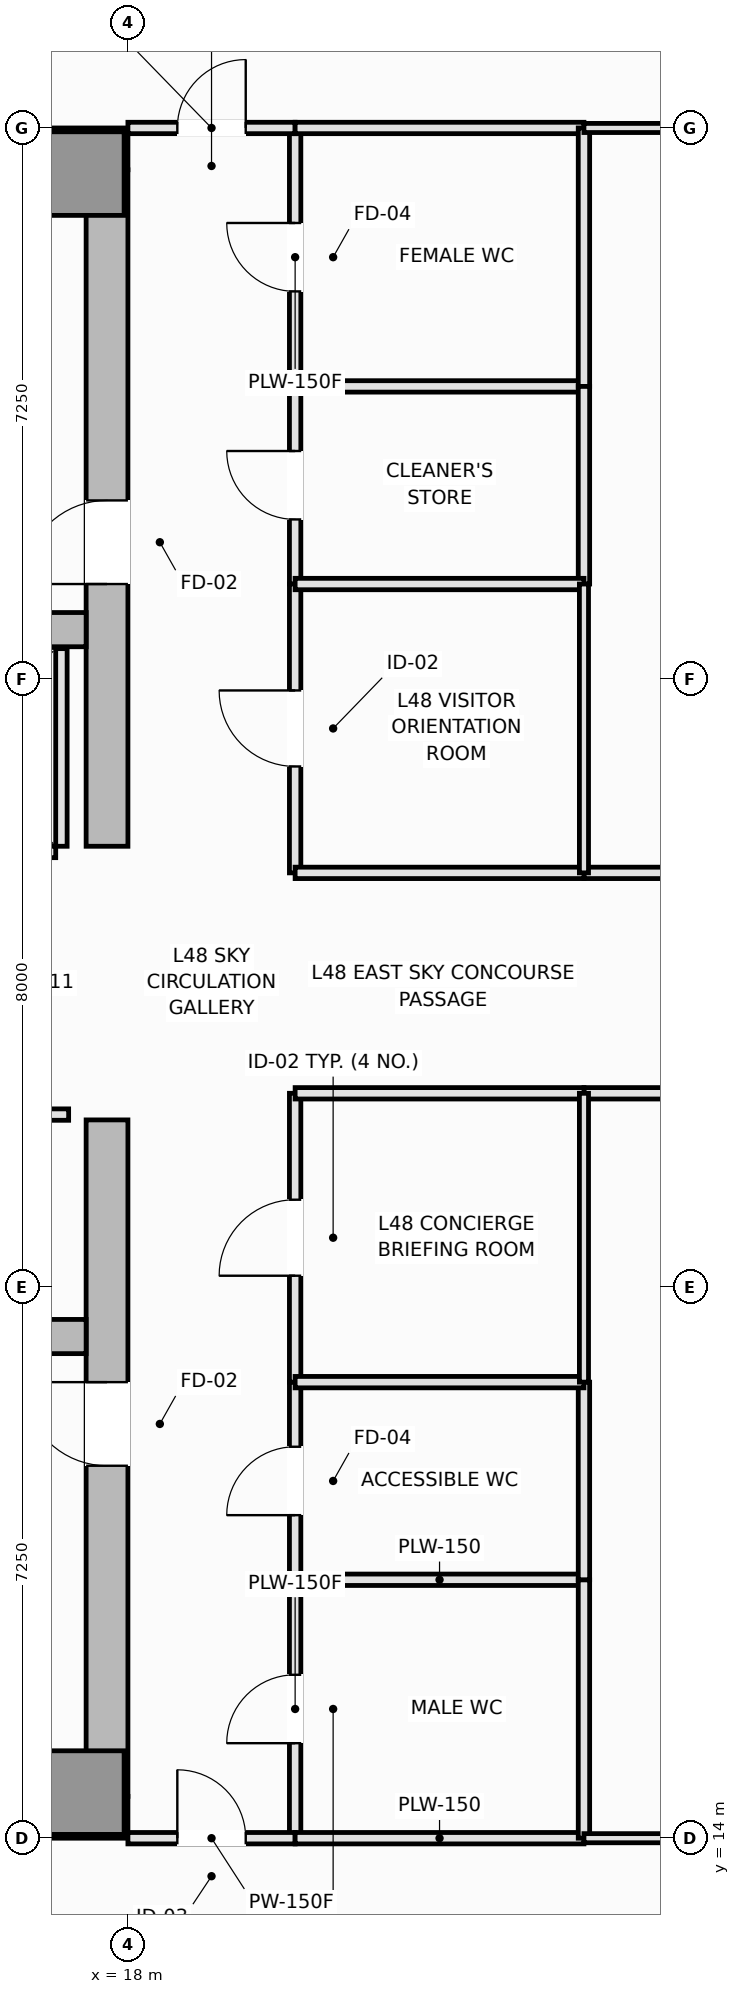
"""IFC4 building model, lengths in metres.
Left out: names, types, materials, properties, quantities, classifications, styles, units other than length and angle.
Written with IfcOpenShell. Run it as: python <this file> out.ifc"""

import sys

from ifc_helpers import new_model, si_unit, direction, frame, frame_2d, origin, origin_2d, place, context, subcontext, project, spatial, rectangle, extrude, element, fill, save


model = new_model("IFC4")
c1 = context("Model", 3, precision=1e-05, world=origin(), true_north=direction((0.0, 1.0)))
c2 = subcontext(c1, "Body", "Model", "MODEL_VIEW")
j1 = project(units=[si_unit("LENGTHUNIT", "METRE"), si_unit("PLANEANGLEUNIT", "RADIAN")], contexts=[c1])
p1 = place(None, origin())
s1 = spatial("IfcSite", under=j1, at=p1, CompositionType="ELEMENT")
p2 = place(p1, origin())
s2 = spatial("IfcBuilding", under=s1, at=p2, CompositionType="ELEMENT")
p3 = place(p2, frame((0.0, 0.0, 183.65)))
s3 = spatial("IfcBuildingStorey", under=s2, at=p3, CompositionType="ELEMENT", Elevation=183.65)
for number, where, z_axis, x_axis in (
    (1, (4.5, 14.275, 0.0), (0.0, 0.0, 1.0), (1.0, 0.0, 0.0)),
    (2, (4.5, 36.225, 0.0), (0.0, 0.0, 1.0), (1.0, 0.0, 0.0)),
):
    element("IfcWall", number, at=place(p3, frame(where, z_axis=z_axis, x_axis=x_axis)), inside=s3, PredefinedType="SHEAR", context=c2, shape_type="SweptSolid", body=[
        extrude(rectangle(XDim=13.5, YDim=0.55, at=frame_2d((6.75, 0.0))), origin(), (0.0, 0.0, 1.0), 4.4),
    ])
p4 = place(p3, frame((17.725, 14.55, 0.0), z_axis=(0.0, 0.0, 1.0), x_axis=(0.0, 1.0, 0.0)))
e3 = element("IfcWall", 3, at=p4, inside=s3, PredefinedType="SHEAR", context=c2, shape_type="SweptSolid", body=[
    extrude(rectangle(XDim=8.9, YDim=0.55, at=frame_2d((4.45, 0.0))), origin(), (0.0, 0.0, 1.0), 4.4),
])
p5 = place(p4, frame((4.35, 0.0, 0.0)))
e4 = element("IfcOpeningElement", 4, at=p5, cuts=e3, PredefinedType="OPENING", context=c2, shape_type="SweptSolid", body=[
    extrude(rectangle(XDim=1.1, YDim=2.15, at=frame_2d((0.55, 1.075))), frame((0.0, 0.285, 0.0), z_axis=(0.0, -1.0, 0.0), x_axis=(1.0, 0.0, 0.0)), (0.0, 0.0, 1.0), 0.57),
])
p6 = place(p3, frame((17.725, 27.05, 0.0), z_axis=(0.0, 0.0, 1.0), x_axis=(0.0, 1.0, 0.0)))
e5 = element("IfcWall", 5, at=p6, inside=s3, PredefinedType="SHEAR", context=c2, shape_type="SweptSolid", body=[
    extrude(rectangle(XDim=8.9, YDim=0.55, at=frame_2d((4.45, 0.0))), origin(), (0.0, 0.0, 1.0), 4.4),
])
p7 = place(p6, frame((3.45, 0.0, 0.0)))
e6 = element("IfcOpeningElement", 6, at=p7, cuts=e5, PredefinedType="OPENING", context=c2, shape_type="SweptSolid", body=[
    extrude(rectangle(XDim=1.1, YDim=2.15, at=frame_2d((0.55, 1.075))), frame((0.0, 0.285, 0.0), z_axis=(0.0, -1.0, 0.0), x_axis=(1.0, 0.0, 0.0)), (0.0, 0.0, 1.0), 0.57),
])
for number, where, z_axis, x_axis in (
    (7, (5.05, 20.6, 0.0), (0.0, 0.0, 1.0), (1.0, 0.0, 0.0)),
    (8, (5.05, 29.9, 0.0), (0.0, 0.0, 1.0), (1.0, 0.0, 0.0)),
):
    element("IfcWall", number, at=place(p3, frame(where, z_axis=z_axis, x_axis=x_axis)), inside=s3, PredefinedType="SHEAR", context=c2, shape_type="SweptSolid", body=[
        extrude(rectangle(XDim=12.4, YDim=0.45, at=frame_2d((6.2, 0.0))), origin(), (0.0, 0.0, 1.0), 4.4),
    ])
for number, where, z_axis, x_axis in (
    (9, (17.4, 14.6, 0.0), (0.0, 0.0, 1.0), (1.0, 0.0, 0.0)),
    (10, (17.4, 35.9, 0.0), (0.0, 0.0, 1.0), (1.0, 0.0, 0.0)),
):
    element("IfcColumn", number, at=place(p3, frame(where, z_axis=z_axis, x_axis=x_axis)), inside=s3, PredefinedType="PILASTER", context=c2, shape_type="SweptSolid", body=[
        extrude(rectangle(XDim=1.1, YDim=1.1, at=origin_2d()), origin(), (0.0, 0.0, 1.0), 4.4),
    ])
p8 = place(p3, frame((14.5, 26.975, 0.0), z_axis=(0.0, 0.0, 1.0), x_axis=(1.0, 0.0, 0.0)))
e11 = element("IfcWall", 11, at=p8, inside=s3, PredefinedType="PARTITIONING", context=c2, shape_type="SweptSolid", body=[
    extrude(rectangle(XDim=2.55, YDim=0.15, at=frame_2d((1.275, 0.0))), origin(), (0.0, 0.0, 1.0), 4.22),
])
p9 = place(p8, frame((0.625, 0.0, 0.0)))
e12 = element("IfcOpeningElement", 12, at=p9, cuts=e11, PredefinedType="OPENING", context=c2, shape_type="SweptSolid", body=[
    extrude(rectangle(XDim=1.3, YDim=2.2, at=frame_2d((0.65, 1.1))), frame((0.0, 0.085, 0.0), z_axis=(0.0, -1.0, 0.0), x_axis=(1.0, 0.0, 0.0)), (0.0, 0.0, 1.0), 0.17),
])
p10 = place(p3, frame((17.125, 27.05, 0.0), z_axis=(0.0, 0.0, 1.0), x_axis=(0.0, 1.0, 0.0)))
e13 = element("IfcWall", 13, at=p10, inside=s3, PredefinedType="PARTITIONING", context=c2, shape_type="SweptSolid", body=[
    extrude(rectangle(XDim=2.6, YDim=0.15, at=frame_2d((1.3, 0.0))), origin(), (0.0, 0.0, 1.0), 4.22),
])
p11 = place(p3, frame((14.33, 23.52, 0.0), z_axis=(0.0, 0.0, 1.0), x_axis=(1.0, 0.0, 0.0)))
e14 = element("IfcWall", 14, at=p11, inside=s3, PredefinedType="PARTITIONING", context=c2, shape_type="SweptSolid", body=[
    extrude(rectangle(XDim=2.89, YDim=0.15, at=frame_2d((1.445, 0.0))), origin(), (0.0, 0.0, 1.0), 4.22),
])
p12 = place(p11, frame((0.28, 0.0, 0.0)))
e15 = element("IfcOpeningElement", 15, at=p12, cuts=e14, PredefinedType="OPENING", context=c2, shape_type="SweptSolid", body=[
    extrude(rectangle(XDim=0.9, YDim=2.1, at=frame_2d((0.45, 1.05))), frame((0.0, 0.085, 0.0), z_axis=(0.0, -1.0, 0.0), x_axis=(1.0, 0.0, 0.0)), (0.0, 0.0, 1.0), 0.17),
])
p13 = place(p11, frame((1.71, 0.0, 0.0)))
e16 = element("IfcOpeningElement", 16, at=p13, cuts=e14, PredefinedType="OPENING", context=c2, shape_type="SweptSolid", body=[
    extrude(rectangle(XDim=0.9, YDim=2.1, at=frame_2d((0.45, 1.05))), frame((0.0, 0.085, 0.0), z_axis=(0.0, -1.0, 0.0), x_axis=(1.0, 0.0, 0.0)), (0.0, 0.0, 1.0), 0.17),
])
p14 = place(p3, frame((20.2, 14.0, 0.0), z_axis=(0.0, 0.0, 1.0), x_axis=(0.0, 1.0, 0.0)))
e17 = element("IfcWall", 17, at=p14, inside=s3, PredefinedType="PLUMBINGWALL", context=c2, shape_type="SweptSolid", body=[
    extrude(rectangle(XDim=3.4, YDim=0.15, at=frame_2d((1.7, 0.0))), origin(), (0.0, 0.0, 1.0), 4.22),
])
p15 = place(p14, frame((1.25, 0.0, 0.0)))
e18 = element("IfcOpeningElement", 18, at=p15, cuts=e17, PredefinedType="OPENING", context=c2, shape_type="SweptSolid", body=[
    extrude(rectangle(XDim=0.9, YDim=2.1, at=frame_2d((0.45, 1.05))), frame((0.0, 0.085, 0.0), z_axis=(0.0, -1.0, 0.0), x_axis=(1.0, 0.0, 0.0)), (0.0, 0.0, 1.0), 0.17),
])
p16 = place(p3, frame((20.2, 33.1, 0.0), z_axis=(0.0, 0.0, 1.0), x_axis=(0.0, 1.0, 0.0)))
e19 = element("IfcWall", 19, at=p16, inside=s3, PredefinedType="PLUMBINGWALL", context=c2, shape_type="SweptSolid", body=[
    extrude(rectangle(XDim=3.4, YDim=0.15, at=frame_2d((1.7, 0.0))), origin(), (0.0, 0.0, 1.0), 4.22),
])
p17 = place(p16, frame((1.25, 0.0, 0.0)))
e20 = element("IfcOpeningElement", 20, at=p17, cuts=e19, PredefinedType="OPENING", context=c2, shape_type="SweptSolid", body=[
    extrude(rectangle(XDim=0.9, YDim=2.1, at=frame_2d((0.45, 1.05))), frame((0.0, 0.085, 0.0), z_axis=(0.0, -1.0, 0.0), x_axis=(1.0, 0.0, 0.0)), (0.0, 0.0, 1.0), 0.17),
])
p18 = place(p3, frame((20.2, 17.4, 0.0), z_axis=(0.0, 0.0, 1.0), x_axis=(0.0, 1.0, 0.0)))
e21 = element("IfcWall", 21, at=p18, inside=s3, PredefinedType="PLUMBINGWALL", context=c2, shape_type="SweptSolid", body=[
    extrude(rectangle(XDim=2.6, YDim=0.15, at=frame_2d((1.3, 0.0))), origin(), (0.0, 0.0, 1.0), 4.22),
])
p19 = place(p18, frame((0.85, 0.0, 0.0)))
e22 = element("IfcOpeningElement", 22, at=p19, cuts=e21, PredefinedType="OPENING", context=c2, shape_type="SweptSolid", body=[
    extrude(rectangle(XDim=0.9, YDim=2.1, at=frame_2d((0.45, 1.05))), frame((0.0, 0.085, 0.0), z_axis=(0.0, -1.0, 0.0), x_axis=(1.0, 0.0, 0.0)), (0.0, 0.0, 1.0), 0.17),
])
p20 = place(p3, frame((20.2, 30.5, 0.0), z_axis=(0.0, 0.0, 1.0), x_axis=(0.0, 1.0, 0.0)))
e23 = element("IfcWall", 23, at=p20, inside=s3, PredefinedType="PLUMBINGWALL", context=c2, shape_type="SweptSolid", body=[
    extrude(rectangle(XDim=2.6, YDim=0.15, at=frame_2d((1.3, 0.0))), origin(), (0.0, 0.0, 1.0), 4.22),
])
p21 = place(p20, frame((0.85, 0.0, 0.0)))
e24 = element("IfcOpeningElement", 24, at=p21, cuts=e23, PredefinedType="OPENING", context=c2, shape_type="SweptSolid", body=[
    extrude(rectangle(XDim=0.9, YDim=2.1, at=frame_2d((0.45, 1.05))), frame((0.0, 0.085, 0.0), z_axis=(0.0, -1.0, 0.0), x_axis=(1.0, 0.0, 0.0)), (0.0, 0.0, 1.0), 0.17),
])
p22 = place(p3, frame((18.0, 14.0, 0.0), z_axis=(0.0, 0.0, 1.0), x_axis=(1.0, 0.0, 0.0)))
e25 = element("IfcWall", 25, at=p22, inside=s3, PredefinedType="PARTITIONING", context=c2, shape_type="SweptSolid", body=[
    extrude(rectangle(XDim=2.2, YDim=0.15, at=frame_2d((1.1, 0.0))), origin(), (0.0, 0.0, 1.0), 4.22),
])
p23 = place(p22, frame((0.65, 0.0, 0.0)))
e26 = element("IfcOpeningElement", 26, at=p23, cuts=e25, PredefinedType="OPENING", context=c2, shape_type="SweptSolid", body=[
    extrude(rectangle(XDim=0.9, YDim=2.1, at=frame_2d((0.45, 1.05))), frame((0.0, 0.085, 0.0), z_axis=(0.0, -1.0, 0.0), x_axis=(1.0, 0.0, 0.0)), (0.0, 0.0, 1.0), 0.17),
])
p24 = place(p3, frame((18.0, 36.5, 0.0), z_axis=(0.0, 0.0, 1.0), x_axis=(1.0, 0.0, 0.0)))
e27 = element("IfcWall", 27, at=p24, inside=s3, PredefinedType="PARTITIONING", context=c2, shape_type="SweptSolid", body=[
    extrude(rectangle(XDim=2.2, YDim=0.15, at=frame_2d((1.1, 0.0))), origin(), (0.0, 0.0, 1.0), 4.22),
])
p25 = place(p24, frame((0.65, 0.0, 0.0)))
e28 = element("IfcOpeningElement", 28, at=p25, cuts=e27, PredefinedType="OPENING", context=c2, shape_type="SweptSolid", body=[
    extrude(rectangle(XDim=0.9, YDim=2.1, at=frame_2d((0.45, 1.05))), frame((0.0, 0.085, 0.0), z_axis=(0.0, -1.0, 0.0), x_axis=(1.0, 0.0, 0.0)), (0.0, 0.0, 1.0), 0.17),
])
p26 = place(p3, frame((20.2, 20.0, 0.0), z_axis=(0.0, 0.0, 1.0), x_axis=(0.0, 1.0, 0.0)))
e29 = element("IfcWall", 29, at=p26, inside=s3, PredefinedType="PARTITIONING", context=c2, shape_type="SweptSolid", body=[
    extrude(rectangle(XDim=3.8, YDim=0.15, at=frame_2d((1.9, 0.0))), origin(), (0.0, 0.0, 1.0), 4.22),
])
p27 = place(p26, frame((1.4, 0.0, 0.0)))
e30 = element("IfcOpeningElement", 30, at=p27, cuts=e29, PredefinedType="OPENING", context=c2, shape_type="SweptSolid", body=[
    extrude(rectangle(XDim=1.0, YDim=2.15, at=frame_2d((0.5, 1.075))), frame((0.0, 0.085, 0.0), z_axis=(0.0, -1.0, 0.0), x_axis=(1.0, 0.0, 0.0)), (0.0, 0.0, 1.0), 0.17),
])
p28 = place(p3, frame((20.2, 26.7, 0.0), z_axis=(0.0, 0.0, 1.0), x_axis=(0.0, 1.0, 0.0)))
e31 = element("IfcWall", 31, at=p28, inside=s3, PredefinedType="PARTITIONING", context=c2, shape_type="SweptSolid", body=[
    extrude(rectangle(XDim=3.8, YDim=0.15, at=frame_2d((1.9, 0.0))), origin(), (0.0, 0.0, 1.0), 4.22),
])
p29 = place(p28, frame((1.4, 0.0, 0.0)))
e32 = element("IfcOpeningElement", 32, at=p29, cuts=e31, PredefinedType="OPENING", context=c2, shape_type="SweptSolid", body=[
    extrude(rectangle(XDim=1.0, YDim=2.15, at=frame_2d((0.5, 1.075))), frame((0.0, 0.085, 0.0), z_axis=(0.0, -1.0, 0.0), x_axis=(1.0, 0.0, 0.0)), (0.0, 0.0, 1.0), 0.17),
])
p30 = place(p3, frame((24.0, 23.8, 0.0), z_axis=(0.0, 0.0, 1.0), x_axis=(1.0, 0.0, 0.0)))
e33 = element("IfcWall", 33, at=p30, inside=s3, PredefinedType="PARTITIONING", context=c2, shape_type="SweptSolid", body=[
    extrude(rectangle(XDim=10.5, YDim=0.15, at=frame_2d((5.25, 0.0))), origin(), (0.0, 0.0, 1.0), 4.22),
])
p31 = place(p30, frame((4.75, 0.0, 0.0)))
e34 = element("IfcOpeningElement", 34, at=p31, cuts=e33, PredefinedType="OPENING", context=c2, shape_type="SweptSolid", body=[
    extrude(rectangle(XDim=1.0, YDim=2.15, at=frame_2d((0.5, 1.075))), frame((0.0, 0.085, 0.0), z_axis=(0.0, -1.0, 0.0), x_axis=(1.0, 0.0, 0.0)), (0.0, 0.0, 1.0), 0.17),
])
p32 = place(p3, frame((24.0, 26.7, 0.0), z_axis=(0.0, 0.0, 1.0), x_axis=(1.0, 0.0, 0.0)))
e35 = element("IfcWall", 35, at=p32, inside=s3, PredefinedType="PARTITIONING", context=c2, shape_type="SweptSolid", body=[
    extrude(rectangle(XDim=10.5, YDim=0.15, at=frame_2d((5.25, 0.0))), origin(), (0.0, 0.0, 1.0), 4.22),
])
p33 = place(p32, frame((4.75, 0.0, 0.0)))
e36 = element("IfcOpeningElement", 36, at=p33, cuts=e35, PredefinedType="OPENING", context=c2, shape_type="SweptSolid", body=[
    extrude(rectangle(XDim=1.0, YDim=2.15, at=frame_2d((0.5, 1.075))), frame((0.0, 0.085, 0.0), z_axis=(0.0, -1.0, 0.0), x_axis=(1.0, 0.0, 0.0)), (0.0, 0.0, 1.0), 0.17),
])
for number, where, z_axis, x_axis in (
    (37, (20.2, 23.8, 0.0), (0.0, 0.0, 1.0), (1.0, 0.0, 0.0)),
    (38, (20.2, 26.7, 0.0), (0.0, 0.0, 1.0), (1.0, 0.0, 0.0)),
):
    element("IfcWall", number, at=place(p3, frame(where, z_axis=z_axis, x_axis=x_axis)), inside=s3, PredefinedType="PARTITIONING", context=c2, shape_type="SweptSolid", body=[
        extrude(rectangle(XDim=3.8, YDim=0.15, at=frame_2d((1.9, 0.0))), origin(), (0.0, 0.0, 1.0), 4.22),
    ])
for number, where, z_axis, x_axis in (
    (39, (20.2, 17.4, 0.0), (0.0, 0.0, 1.0), (1.0, 0.0, 0.0)),
    (40, (20.2, 14.0, 0.0), (0.0, 0.0, 1.0), (1.0, 0.0, 0.0)),
):
    element("IfcWall", number, at=place(p3, frame(where, z_axis=z_axis, x_axis=x_axis)), inside=s3, PredefinedType="PLUMBINGWALL", context=c2, shape_type="SweptSolid", body=[
        extrude(rectangle(XDim=3.8, YDim=0.15, at=frame_2d((1.9, 0.0))), origin(), (0.0, 0.0, 1.0), 4.22),
    ])
p34 = place(p3, frame((24.0, 14.0, 0.0), z_axis=(0.0, 0.0, 1.0), x_axis=(0.0, 1.0, 0.0)))
e41 = element("IfcWall", 41, at=p34, inside=s3, PredefinedType="PLUMBINGWALL", context=c2, shape_type="SweptSolid", body=[
    extrude(rectangle(XDim=3.4, YDim=0.15, at=frame_2d((1.7, 0.0))), origin(), (0.0, 0.0, 1.0), 4.22),
])
for number, where, z_axis, x_axis in (
    (42, (20.2, 33.1, 0.0), (0.0, 0.0, 1.0), (1.0, 0.0, 0.0)),
    (43, (20.2, 36.5, 0.0), (0.0, 0.0, 1.0), (1.0, 0.0, 0.0)),
):
    element("IfcWall", number, at=place(p3, frame(where, z_axis=z_axis, x_axis=x_axis)), inside=s3, PredefinedType="PLUMBINGWALL", context=c2, shape_type="SweptSolid", body=[
        extrude(rectangle(XDim=3.8, YDim=0.15, at=frame_2d((1.9, 0.0))), origin(), (0.0, 0.0, 1.0), 4.22),
    ])
p35 = place(p3, frame((24.0, 33.1, 0.0), z_axis=(0.0, 0.0, 1.0), x_axis=(0.0, 1.0, 0.0)))
e44 = element("IfcWall", 44, at=p35, inside=s3, PredefinedType="PLUMBINGWALL", context=c2, shape_type="SweptSolid", body=[
    extrude(rectangle(XDim=3.4, YDim=0.15, at=frame_2d((1.7, 0.0))), origin(), (0.0, 0.0, 1.0), 4.22),
])
p36 = place(p3, frame((24.0, 17.4, 0.0), z_axis=(0.0, 0.0, 1.0), x_axis=(0.0, 1.0, 0.0)))
e45 = element("IfcWall", 45, at=p36, inside=s3, PredefinedType="PLUMBINGWALL", context=c2, shape_type="SweptSolid", body=[
    extrude(rectangle(XDim=2.6, YDim=0.15, at=frame_2d((1.3, 0.0))), origin(), (0.0, 0.0, 1.0), 4.22),
])
p37 = place(p3, frame((20.2, 20.0, 0.0), z_axis=(0.0, 0.0, 1.0), x_axis=(1.0, 0.0, 0.0)))
e46 = element("IfcWall", 46, at=p37, inside=s3, PredefinedType="PLUMBINGWALL", context=c2, shape_type="SweptSolid", body=[
    extrude(rectangle(XDim=3.8, YDim=0.15, at=frame_2d((1.9, 0.0))), origin(), (0.0, 0.0, 1.0), 4.22),
])
p38 = place(p3, frame((24.0, 30.5, 0.0), z_axis=(0.0, 0.0, 1.0), x_axis=(0.0, 1.0, 0.0)))
e47 = element("IfcWall", 47, at=p38, inside=s3, PredefinedType="PLUMBINGWALL", context=c2, shape_type="SweptSolid", body=[
    extrude(rectangle(XDim=2.6, YDim=0.15, at=frame_2d((1.3, 0.0))), origin(), (0.0, 0.0, 1.0), 4.22),
])
p39 = place(p3, frame((20.2, 30.5, 0.0), z_axis=(0.0, 0.0, 1.0), x_axis=(1.0, 0.0, 0.0)))
e48 = element("IfcWall", 48, at=p39, inside=s3, PredefinedType="PLUMBINGWALL", context=c2, shape_type="SweptSolid", body=[
    extrude(rectangle(XDim=3.8, YDim=0.15, at=frame_2d((1.9, 0.0))), origin(), (0.0, 0.0, 1.0), 4.22),
])
for number, where, z_axis, x_axis in (
    (49, (24.0, 14.0, 0.0), (0.0, 0.0, 1.0), (1.0, 0.0, 0.0)),
    (50, (24.0, 36.5, 0.0), (0.0, 0.0, 1.0), (1.0, 0.0, 0.0)),
):
    element("IfcWall", number, at=place(p3, frame(where, z_axis=z_axis, x_axis=x_axis)), inside=s3, PredefinedType="PARTITIONING", context=c2, shape_type="SweptSolid", body=[
        extrude(rectangle(XDim=10.5, YDim=0.12, at=frame_2d((5.25, 0.0))), origin(), (0.0, 0.0, 1.0), 4.22),
    ])
for number, where, z_axis, x_axis in (
    (51, (24.0, 20.0, 0.0), (0.0, 0.0, 1.0), (0.0, 1.0, 0.0)),
    (52, (24.0, 26.7, 0.0), (0.0, 0.0, 1.0), (0.0, 1.0, 0.0)),
):
    element("IfcWall", number, at=place(p3, frame(where, z_axis=z_axis, x_axis=x_axis)), inside=s3, PredefinedType="PARTITIONING", context=c2, shape_type="SweptSolid", body=[
        extrude(rectangle(XDim=3.8, YDim=0.12, at=frame_2d((1.9, 0.0))), origin(), (0.0, 0.0, 1.0), 4.22),
    ])
p40 = place(p5, origin())
e53 = element("IfcDoor", 53, at=p40, inside=s3, OperationType="SINGLE_SWING_RIGHT", PredefinedType="DOOR", context=c2, shape_type="SweptSolid", body=[
    extrude(rectangle(XDim=1.1, YDim=2.15, at=frame_2d((0.55, 1.075))), frame((0.0, 0.025, 0.0), z_axis=(0.0, -1.0, 0.0), x_axis=(1.0, 0.0, 0.0)), (0.0, 0.0, 1.0), 0.05),
])
fill(e4, e53)
p41 = place(p7, origin())
e54 = element("IfcDoor", 54, at=p41, inside=s3, OperationType="SINGLE_SWING_LEFT", PredefinedType="DOOR", context=c2, shape_type="SweptSolid", body=[
    extrude(rectangle(XDim=1.1, YDim=2.15, at=frame_2d((0.55, 1.075))), frame((0.0, 0.025, 0.0), z_axis=(0.0, -1.0, 0.0), x_axis=(1.0, 0.0, 0.0)), (0.0, 0.0, 1.0), 0.05),
])
fill(e6, e54)
p42 = place(p15, origin())
e55 = element("IfcDoor", 55, at=p42, inside=s3, OperationType="SINGLE_SWING_LEFT", PredefinedType="DOOR", context=c2, shape_type="SweptSolid", body=[
    extrude(rectangle(XDim=0.9, YDim=2.1, at=frame_2d((0.45, 1.05))), frame((0.0, 0.025, 0.0), z_axis=(0.0, -1.0, 0.0), x_axis=(1.0, 0.0, 0.0)), (0.0, 0.0, 1.0), 0.05),
])
fill(e18, e55)
p43 = place(p17, origin())
e56 = element("IfcDoor", 56, at=p43, inside=s3, OperationType="SINGLE_SWING_RIGHT", PredefinedType="DOOR", context=c2, shape_type="SweptSolid", body=[
    extrude(rectangle(XDim=0.9, YDim=2.1, at=frame_2d((0.45, 1.05))), frame((0.0, 0.025, 0.0), z_axis=(0.0, -1.0, 0.0), x_axis=(1.0, 0.0, 0.0)), (0.0, 0.0, 1.0), 0.05),
])
fill(e20, e56)
p44 = place(p19, origin())
e57 = element("IfcDoor", 57, at=p44, inside=s3, OperationType="SINGLE_SWING_LEFT", PredefinedType="DOOR", context=c2, shape_type="SweptSolid", body=[
    extrude(rectangle(XDim=0.9, YDim=2.1, at=frame_2d((0.45, 1.05))), frame((0.0, 0.025, 0.0), z_axis=(0.0, -1.0, 0.0), x_axis=(1.0, 0.0, 0.0)), (0.0, 0.0, 1.0), 0.05),
])
fill(e22, e57)
p45 = place(p21, origin())
e58 = element("IfcDoor", 58, at=p45, inside=s3, OperationType="SINGLE_SWING_RIGHT", PredefinedType="DOOR", context=c2, shape_type="SweptSolid", body=[
    extrude(rectangle(XDim=0.9, YDim=2.1, at=frame_2d((0.45, 1.05))), frame((0.0, 0.025, 0.0), z_axis=(0.0, -1.0, 0.0), x_axis=(1.0, 0.0, 0.0)), (0.0, 0.0, 1.0), 0.05),
])
fill(e24, e58)
p46 = place(p23, origin())
e59 = element("IfcDoor", 59, at=p46, inside=s3, OperationType="SINGLE_SWING_LEFT", PredefinedType="DOOR", context=c2, shape_type="SweptSolid", body=[
    extrude(rectangle(XDim=0.9, YDim=2.1, at=frame_2d((0.45, 1.05))), frame((0.0, 0.025, 0.0), z_axis=(0.0, -1.0, 0.0), x_axis=(1.0, 0.0, 0.0)), (0.0, 0.0, 1.0), 0.05),
])
fill(e26, e59)
p47 = place(p25, origin())
e60 = element("IfcDoor", 60, at=p47, inside=s3, OperationType="SINGLE_SWING_RIGHT", PredefinedType="DOOR", context=c2, shape_type="SweptSolid", body=[
    extrude(rectangle(XDim=0.9, YDim=2.1, at=frame_2d((0.45, 1.05))), frame((0.0, 0.025, 0.0), z_axis=(0.0, -1.0, 0.0), x_axis=(1.0, 0.0, 0.0)), (0.0, 0.0, 1.0), 0.05),
])
fill(e28, e60)
p48 = place(p27, origin())
e61 = element("IfcDoor", 61, at=p48, inside=s3, OperationType="SINGLE_SWING_LEFT", PredefinedType="DOOR", context=c2, shape_type="SweptSolid", body=[
    extrude(rectangle(XDim=1.0, YDim=2.15, at=frame_2d((0.5, 1.075))), frame((0.0, 0.025, 0.0), z_axis=(0.0, -1.0, 0.0), x_axis=(1.0, 0.0, 0.0)), (0.0, 0.0, 1.0), 0.05),
])
fill(e30, e61)
p49 = place(p29, origin())
e62 = element("IfcDoor", 62, at=p49, inside=s3, OperationType="SINGLE_SWING_RIGHT", PredefinedType="DOOR", context=c2, shape_type="SweptSolid", body=[
    extrude(rectangle(XDim=1.0, YDim=2.15, at=frame_2d((0.5, 1.075))), frame((0.0, 0.025, 0.0), z_axis=(0.0, -1.0, 0.0), x_axis=(1.0, 0.0, 0.0)), (0.0, 0.0, 1.0), 0.05),
])
fill(e32, e62)
save(model, sys.argv[1])
